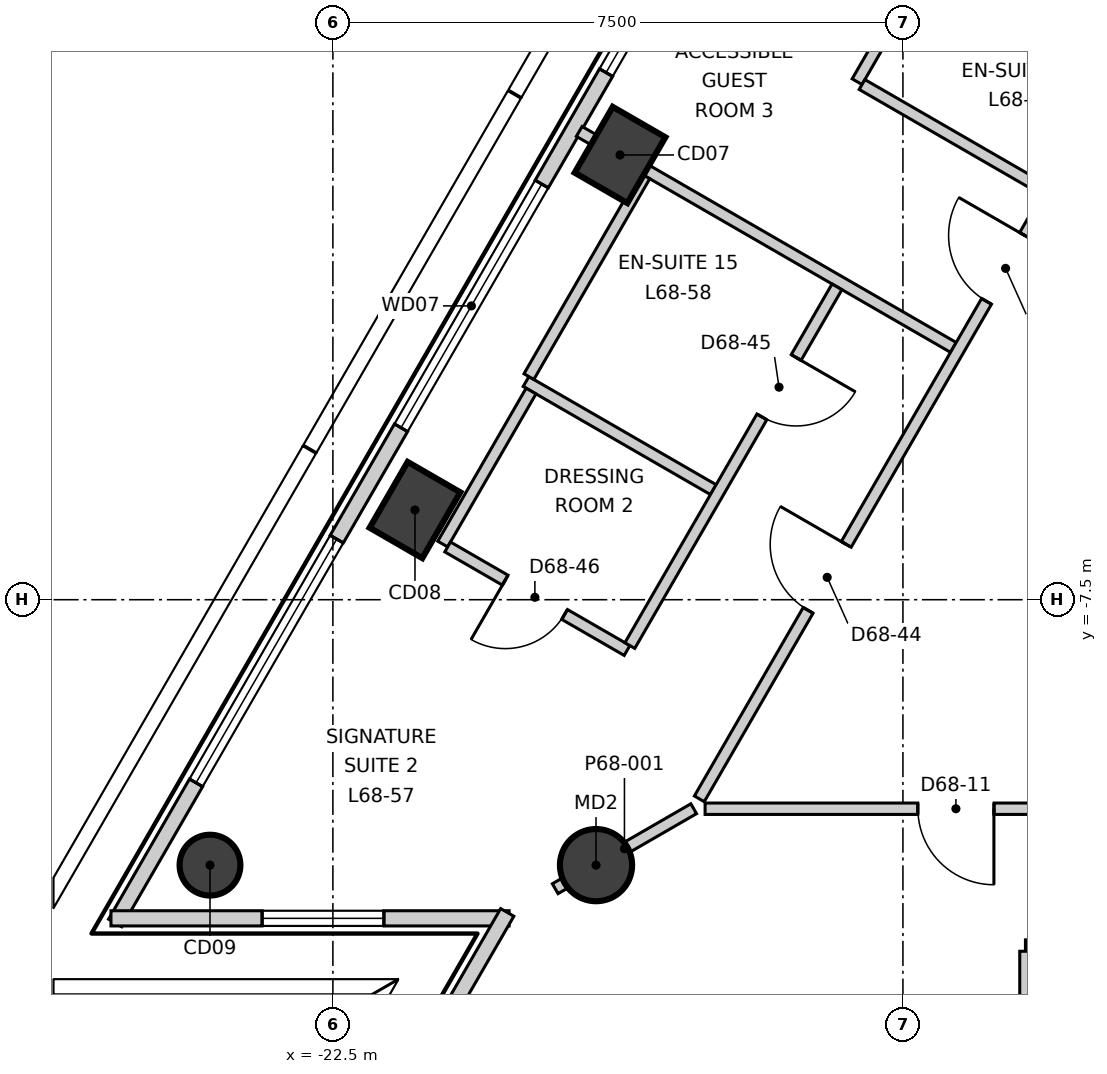
"""IFC4 building model, lengths in metres.
Left out: names, types, materials, properties, quantities, classifications, styles, units other than length and angle.
Written with IfcOpenShell. Run it as: python <this file> out.ifc"""

import sys

from ifc_helpers import new_model, si_unit, direction, frame, frame_2d, origin, origin_2d, place, context, subcontext, project, spatial, rectangle, circle, extrude, element, fill, save


model = new_model("IFC4")
c1 = context("Model", 3, precision=1e-05, world=origin(), true_north=direction((0.0, 1.0)))
c2 = subcontext(c1, "Body", "Model", "MODEL_VIEW")
j1 = project(units=[si_unit("LENGTHUNIT", "METRE"), si_unit("PLANEANGLEUNIT", "RADIAN")], contexts=[c1])
p1 = place(None, origin())
s1 = spatial("IfcSite", under=j1, at=p1, CompositionType="ELEMENT")
p2 = place(p1, origin())
s2 = spatial("IfcBuilding", under=s1, at=p2, CompositionType="ELEMENT")
p3 = place(p2, frame((0.0, 0.0, 289.9)))
s3 = spatial("IfcBuildingStorey", under=s2, at=p3, CompositionType="ELEMENT", Elevation=289.9)
for number, where, z_axis, x_axis in (
    (1, (-18.722, -1.649, -0.3), (0.0, 0.0, 1.0), (0.5, 0.866, 0.0)),
    (2, (-21.42, -6.32, -0.3), (0.0, 0.0, 1.0), (0.5, 0.866, 0.0)),
):
    element("IfcColumn", number, at=place(p3, frame(where, z_axis=z_axis, x_axis=x_axis)), inside=s3, PredefinedType="COLUMN", context=c2, shape_type="SweptSolid", body=[
        extrude(rectangle(XDim=1.0, YDim=0.8, at=origin_2d()), origin(), (0.0, 0.0, 1.0), 3.6),
    ])
p4 = place(p3, frame((-24.117, -10.992, -0.3), z_axis=(0.0, 0.0, 1.0), x_axis=(0.5, 0.866025403784, 0.0)))
e3 = element("IfcColumn", 3, at=p4, inside=s3, PredefinedType="COLUMN", context=c2, shape_type="SweptSolid", body=[
    extrude(circle(Radius=0.4, at=origin_2d()), origin(), (0.0, 0.0, 1.0), 3.6),
])
p5 = place(p3, frame((-19.038, -10.992, -0.3), z_axis=(0.0, 0.0, 1.0), x_axis=(1.0, 0.0, 0.0)))
e4 = element("IfcColumn", 4, at=p5, inside=s3, PredefinedType="COLUMN", context=c2, shape_type="SweptSolid", body=[
    extrude(circle(Radius=0.475, at=origin_2d()), origin(), (0.0, 0.0, 1.0), 3.6),
])
p6 = place(p3, frame((-2.494, 27.86, 0.0), z_axis=(0.0, 0.0, 1.0), x_axis=(-0.500008134474, -0.866020707292, 0.0)))
e5 = element("IfcWall", 5, at=p6, inside=s3, PredefinedType="ELEMENTEDWALL", context=c2, shape_type="SweptSolid", body=[
    extrude(rectangle(XDim=45.741, YDim=0.2, at=frame_2d((22.871, 0.0))), origin(), (0.0, 0.0, 1.0), 3.3),
])
p7 = place(p6, frame((2.15, 0.0, 0.9)))
e6 = element("IfcOpeningElement", 6, at=p7, cuts=e5, PredefinedType="OPENING", context=c2, shape_type="SweptSolid", body=[
    extrude(rectangle(XDim=3.7, YDim=2.2, at=frame_2d((1.85, 1.1))), frame((0.0, 0.11, 0.0), z_axis=(0.0, -1.0, 0.0), x_axis=(1.0, 0.0, 0.0)), (0.0, 0.0, 1.0), 0.22),
])
p8 = place(p6, frame((7.544, 0.0, 0.9)))
e7 = element("IfcOpeningElement", 7, at=p8, cuts=e5, PredefinedType="OPENING", context=c2, shape_type="SweptSolid", body=[
    extrude(rectangle(XDim=3.7, YDim=2.2, at=frame_2d((1.85, 1.1))), frame((0.0, 0.11, 0.0), z_axis=(0.0, -1.0, 0.0), x_axis=(1.0, 0.0, 0.0)), (0.0, 0.0, 1.0), 0.22),
])
p9 = place(p6, frame((12.939, 0.0, 0.9)))
e8 = element("IfcOpeningElement", 8, at=p9, cuts=e5, PredefinedType="OPENING", context=c2, shape_type="SweptSolid", body=[
    extrude(rectangle(XDim=3.7, YDim=2.2, at=frame_2d((1.85, 1.1))), frame((0.0, 0.11, 0.0), z_axis=(0.0, -1.0, 0.0), x_axis=(1.0, 0.0, 0.0)), (0.0, 0.0, 1.0), 0.22),
])
p10 = place(p6, frame((18.333, 0.0, 0.9)))
e9 = element("IfcOpeningElement", 9, at=p10, cuts=e5, PredefinedType="OPENING", context=c2, shape_type="SweptSolid", body=[
    extrude(rectangle(XDim=3.7, YDim=2.2, at=frame_2d((1.85, 1.1))), frame((0.0, 0.11, 0.0), z_axis=(0.0, -1.0, 0.0), x_axis=(1.0, 0.0, 0.0)), (0.0, 0.0, 1.0), 0.22),
])
p11 = place(p6, frame((23.728, 0.0, 0.9)))
e10 = element("IfcOpeningElement", 10, at=p11, cuts=e5, PredefinedType="OPENING", context=c2, shape_type="SweptSolid", body=[
    extrude(rectangle(XDim=3.7, YDim=2.2, at=frame_2d((1.85, 1.1))), frame((0.0, 0.11, 0.0), z_axis=(0.0, -1.0, 0.0), x_axis=(1.0, 0.0, 0.0)), (0.0, 0.0, 1.0), 0.22),
])
p12 = place(p6, frame((29.122, 0.0, 0.9)))
e11 = element("IfcOpeningElement", 11, at=p12, cuts=e5, PredefinedType="OPENING", context=c2, shape_type="SweptSolid", body=[
    extrude(rectangle(XDim=3.7, YDim=2.2, at=frame_2d((1.85, 1.1))), frame((0.0, 0.11, 0.0), z_axis=(0.0, -1.0, 0.0), x_axis=(1.0, 0.0, 0.0)), (0.0, 0.0, 1.0), 0.22),
])
p13 = place(p6, frame((34.517, 0.0, 0.9)))
e12 = element("IfcOpeningElement", 12, at=p13, cuts=e5, PredefinedType="OPENING", context=c2, shape_type="SweptSolid", body=[
    extrude(rectangle(XDim=3.7, YDim=2.2, at=frame_2d((1.85, 1.1))), frame((0.0, 0.11, 0.0), z_axis=(0.0, -1.0, 0.0), x_axis=(1.0, 0.0, 0.0)), (0.0, 0.0, 1.0), 0.22),
])
p14 = place(p6, frame((39.911, 0.0, 0.9)))
e13 = element("IfcOpeningElement", 13, at=p14, cuts=e5, PredefinedType="OPENING", context=c2, shape_type="SweptSolid", body=[
    extrude(rectangle(XDim=3.7, YDim=2.2, at=frame_2d((1.85, 1.1))), frame((0.0, 0.11, 0.0), z_axis=(0.0, -1.0, 0.0), x_axis=(1.0, 0.0, 0.0)), (0.0, 0.0, 1.0), 0.22),
])
p15 = place(p3, frame((-25.42, -11.692, 0.0), z_axis=(0.0, 0.0, 1.0), x_axis=(1.0, 0.0, 0.0)))
e14 = element("IfcWall", 14, at=p15, inside=s3, PredefinedType="ELEMENTEDWALL", context=c2, shape_type="SweptSolid", body=[
    extrude(rectangle(XDim=5.239, YDim=0.2, at=frame_2d((2.62, 0.0))), origin(), (0.0, 0.0, 1.0), 3.3),
])
p16 = place(p15, frame((1.99, 0.0, 0.9)))
e15 = element("IfcOpeningElement", 15, at=p16, cuts=e14, PredefinedType="OPENING", context=c2, shape_type="SweptSolid", body=[
    extrude(rectangle(XDim=1.6, YDim=2.2, at=frame_2d((0.8, 1.1))), frame((0.0, 0.11, 0.0), z_axis=(0.0, -1.0, 0.0), x_axis=(1.0, 0.0, 0.0)), (0.0, 0.0, 1.0), 0.22),
])
p17 = place(p3, frame((-20.206, -11.614, 0.0), z_axis=(0.0, 0.0, 1.0), x_axis=(-0.499933584342, -0.866063745487, 0.0)))
e16 = element("IfcWall", 16, at=p17, inside=s3, PredefinedType="ELEMENTEDWALL", context=c2, shape_type="SweptSolid", body=[
    extrude(rectangle(XDim=5.239, YDim=0.2, at=frame_2d((2.619, 0.0))), origin(), (0.0, 0.0, 1.0), 3.3),
])
p18 = place(p17, frame((1.39, 0.0, 0.9)))
e17 = element("IfcOpeningElement", 17, at=p18, cuts=e16, PredefinedType="OPENING", context=c2, shape_type="SweptSolid", body=[
    extrude(rectangle(XDim=1.6, YDim=2.2, at=frame_2d((0.8, 1.1))), frame((0.0, 0.11, 0.0), z_axis=(0.0, -1.0, 0.0), x_axis=(1.0, 0.0, 0.0)), (0.0, 0.0, 1.0), 0.22),
])
p19 = place(p3, frame((-19.575, -11.302, 0.0), z_axis=(0.0, 0.0, 1.0), x_axis=(0.866013598413, 0.500020446946, 0.0)))
e18 = element("IfcWall", 18, at=p19, inside=s3, PredefinedType="PARTITIONING", context=c2, shape_type="SweptSolid", body=[
    extrude(rectangle(XDim=2.104, YDim=0.15, at=frame_2d((1.052, 0.0))), origin(), (0.0, 0.0, 1.0), 2.8),
])
p20 = place(p3, frame((-19.259, -1.339, 0.0), z_axis=(0.0, 0.0, 1.0), x_axis=(0.86606758311, -0.499926936147, 0.0)))
e19 = element("IfcWall", 19, at=p20, inside=s3, PredefinedType="PARTITIONING", context=c2, shape_type="SweptSolid", body=[
    extrude(rectangle(XDim=5.684, YDim=0.15, at=frame_2d((2.842, 0.0))), origin(), (0.0, 0.0, 1.0), 3.3),
])
p21 = place(p3, frame((-17.603, -10.25, 0.0), z_axis=(0.0, 0.0, 1.0), x_axis=(1.0, 0.0, 0.0)))
e20 = element("IfcWall", 20, at=p21, inside=s3, PredefinedType="PARTITIONING", context=c2, shape_type="SweptSolid", body=[
    extrude(rectangle(XDim=35.356, YDim=0.15, at=frame_2d((17.678, 0.0))), origin(), (0.0, 0.0, 1.0), 3.3),
])
p22 = place(p21, frame((2.8, 0.0, 0.0)))
e21 = element("IfcOpeningElement", 21, at=p22, cuts=e20, PredefinedType="OPENING", context=c2, shape_type="SweptSolid", body=[
    extrude(rectangle(XDim=1.0, YDim=2.1, at=frame_2d((0.5, 1.05))), frame((0.0, 0.085, 0.0), z_axis=(0.0, -1.0, 0.0), x_axis=(1.0, 0.0, 0.0)), (0.0, 0.0, 1.0), 0.17),
])
p23 = place(p21, frame((15.065, 0.0, 0.0)))
e22 = element("IfcOpeningElement", 22, at=p23, cuts=e20, PredefinedType="OPENING", context=c2, shape_type="SweptSolid", body=[
    extrude(rectangle(XDim=1.0, YDim=2.1, at=frame_2d((0.5, 1.05))), frame((0.0, 0.085, 0.0), z_axis=(0.0, -1.0, 0.0), x_axis=(1.0, 0.0, 0.0)), (0.0, 0.0, 1.0), 0.17),
])
p24 = place(p21, frame((9.765, 0.0, 0.0)))
e23 = element("IfcOpeningElement", 23, at=p24, cuts=e20, PredefinedType="OPENING", context=c2, shape_type="SweptSolid", body=[
    extrude(rectangle(XDim=0.9, YDim=2.1, at=frame_2d((0.45, 1.05))), frame((0.0, 0.085, 0.0), z_axis=(0.0, -1.0, 0.0), x_axis=(1.0, 0.0, 0.0)), (0.0, 0.0, 1.0), 0.17),
])
p25 = place(p21, frame((11.965, 0.0, 0.0)))
e24 = element("IfcOpeningElement", 24, at=p25, cuts=e20, PredefinedType="OPENING", context=c2, shape_type="SweptSolid", body=[
    extrude(rectangle(XDim=0.9, YDim=2.1, at=frame_2d((0.45, 1.05))), frame((0.0, 0.085, 0.0), z_axis=(0.0, -1.0, 0.0), x_axis=(1.0, 0.0, 0.0)), (0.0, 0.0, 1.0), 0.17),
])
p26 = place(p21, frame((20.953, 0.0, 0.0)))
e25 = element("IfcOpeningElement", 25, at=p26, cuts=e20, PredefinedType="OPENING", context=c2, shape_type="SweptSolid", body=[
    extrude(rectangle(XDim=1.0, YDim=2.1, at=frame_2d((0.5, 1.05))), frame((0.0, 0.085, 0.0), z_axis=(0.0, -1.0, 0.0), x_axis=(1.0, 0.0, 0.0)), (0.0, 0.0, 1.0), 0.17),
])
p27 = place(p21, frame((26.347, 0.0, 0.0)))
e26 = element("IfcOpeningElement", 26, at=p27, cuts=e20, PredefinedType="OPENING", context=c2, shape_type="SweptSolid", body=[
    extrude(rectangle(XDim=1.0, YDim=2.1, at=frame_2d((0.5, 1.05))), frame((0.0, 0.085, 0.0), z_axis=(0.0, -1.0, 0.0), x_axis=(1.0, 0.0, 0.0)), (0.0, 0.0, 1.0), 0.17),
])
p28 = place(p21, frame((31.342, 0.0, 0.0)))
e27 = element("IfcOpeningElement", 27, at=p28, cuts=e20, PredefinedType="OPENING", context=c2, shape_type="SweptSolid", body=[
    extrude(rectangle(XDim=1.0, YDim=2.1, at=frame_2d((0.5, 1.05))), frame((0.0, 0.085, 0.0), z_axis=(0.0, -1.0, 0.0), x_axis=(1.0, 0.0, 0.0)), (0.0, 0.0, 1.0), 0.17),
])
p29 = place(p3, frame((-17.679, -10.12, 0.0), z_axis=(0.0, 0.0, 1.0), x_axis=(0.500008955215, 0.866020233427, 0.0)))
e28 = element("IfcWall", 28, at=p29, inside=s3, PredefinedType="PARTITIONING", context=c2, shape_type="SweptSolid", body=[
    extrude(rectangle(XDim=35.357, YDim=0.15, at=frame_2d((17.679, 0.0))), origin(), (0.0, 0.0, 1.0), 3.3),
])
p30 = place(p29, frame((31.407, 0.0, 0.0)))
e29 = element("IfcOpeningElement", 29, at=p30, cuts=e28, PredefinedType="OPENING", context=c2, shape_type="SweptSolid", body=[
    extrude(rectangle(XDim=1.0, YDim=2.1, at=frame_2d((0.5, 1.05))), frame((0.0, 0.085, 0.0), z_axis=(0.0, -1.0, 0.0), x_axis=(1.0, 0.0, 0.0)), (0.0, 0.0, 1.0), 0.17),
])
p31 = place(p29, frame((25.642, 0.0, 0.0)))
e30 = element("IfcOpeningElement", 30, at=p31, cuts=e28, PredefinedType="OPENING", context=c2, shape_type="SweptSolid", body=[
    extrude(rectangle(XDim=1.0, YDim=2.1, at=frame_2d((0.5, 1.05))), frame((0.0, 0.085, 0.0), z_axis=(0.0, -1.0, 0.0), x_axis=(1.0, 0.0, 0.0)), (0.0, 0.0, 1.0), 0.17),
])
p32 = place(p29, frame((18.348, 0.0, 0.0)))
e31 = element("IfcOpeningElement", 31, at=p32, cuts=e28, PredefinedType="OPENING", context=c2, shape_type="SweptSolid", body=[
    extrude(rectangle(XDim=1.0, YDim=2.1, at=frame_2d((0.5, 1.05))), frame((0.0, 0.085, 0.0), z_axis=(0.0, -1.0, 0.0), x_axis=(1.0, 0.0, 0.0)), (0.0, 0.0, 1.0), 0.17),
])
p33 = place(p29, frame((13.254, 0.0, 0.0)))
e32 = element("IfcOpeningElement", 32, at=p33, cuts=e28, PredefinedType="OPENING", context=c2, shape_type="SweptSolid", body=[
    extrude(rectangle(XDim=1.0, YDim=2.1, at=frame_2d((0.5, 1.05))), frame((0.0, 0.085, 0.0), z_axis=(0.0, -1.0, 0.0), x_axis=(1.0, 0.0, 0.0)), (0.0, 0.0, 1.0), 0.17),
])
p34 = place(p29, frame((7.559, 0.0, 0.0)))
e33 = element("IfcOpeningElement", 33, at=p34, cuts=e28, PredefinedType="OPENING", context=c2, shape_type="SweptSolid", body=[
    extrude(rectangle(XDim=1.0, YDim=2.1, at=frame_2d((0.5, 1.05))), frame((0.0, 0.085, 0.0), z_axis=(0.0, -1.0, 0.0), x_axis=(1.0, 0.0, 0.0)), (0.0, 0.0, 1.0), 0.17),
])
p35 = place(p29, frame((2.865, 0.0, 0.0)))
e34 = element("IfcOpeningElement", 34, at=p35, cuts=e28, PredefinedType="OPENING", context=c2, shape_type="SweptSolid", body=[
    extrude(rectangle(XDim=1.0, YDim=2.1, at=frame_2d((0.5, 1.05))), frame((0.0, 0.085, 0.0), z_axis=(0.0, -1.0, 0.0), x_axis=(1.0, 0.0, 0.0)), (0.0, 0.0, 1.0), 0.17),
])
p36 = place(p3, frame((-19.959, -4.63, 0.0), z_axis=(0.0, 0.0, 1.0), x_axis=(0.866085557634, -0.499895795999, 0.0)))
e35 = element("IfcWall", 35, at=p36, inside=s3, PredefinedType="PARTITIONING", context=c2, shape_type="SweptSolid", body=[
    extrude(rectangle(XDim=2.845, YDim=0.15, at=frame_2d((1.422, 0.0))), origin(), (0.0, 0.0, 1.0), 3.3),
])
p37 = place(p3, frame((-21.055, -6.768, 0.0), z_axis=(0.0, 0.0, 1.0), x_axis=(0.499855809005, 0.866108636491, 0.0)))
e36 = element("IfcWall", 36, at=p37, inside=s3, PredefinedType="PARTITIONING", context=c2, shape_type="SweptSolid", body=[
    extrude(rectangle(XDim=2.324, YDim=0.15, at=frame_2d((1.162, 0.0))), origin(), (0.0, 0.0, 1.0), 3.3),
])
p38 = place(p3, frame((-20.99, -6.806, 0.0), z_axis=(0.0, 0.0, 1.0), x_axis=(0.866112488944, -0.499849133735, 0.0)))
e37 = element("IfcWall", 37, at=p38, inside=s3, PredefinedType="PARTITIONING", context=c2, shape_type="SweptSolid", body=[
    extrude(rectangle(XDim=2.725, YDim=0.15, at=frame_2d((1.362, 0.0))), origin(), (0.0, 0.0, 1.0), 3.3),
])
p39 = place(p38, frame((0.875, 0.0, 0.0)))
e38 = element("IfcOpeningElement", 38, at=p39, cuts=e37, PredefinedType="OPENING", context=c2, shape_type="SweptSolid", body=[
    extrude(rectangle(XDim=0.9, YDim=2.1, at=frame_2d((0.45, 1.05))), frame((0.0, 0.085, 0.0), z_axis=(0.0, -1.0, 0.0), x_axis=(1.0, 0.0, 0.0)), (0.0, 0.0, 1.0), 0.17),
])
p40 = place(p3, frame((-18.593, -8.103, 0.0), z_axis=(0.0, 0.0, 1.0), x_axis=(0.500080528864, 0.865978905431, 0.0)))
e39 = element("IfcWall", 39, at=p40, inside=s3, PredefinedType="PARTITIONING", context=c2, shape_type="SweptSolid", body=[
    extrude(rectangle(XDim=5.449, YDim=0.15, at=frame_2d((2.725, 0.0))), origin(), (0.0, 0.0, 1.0), 3.3),
])
p41 = place(p40, frame((3.475, 0.0, 0.0)))
e40 = element("IfcOpeningElement", 40, at=p41, cuts=e39, PredefinedType="OPENING", context=c2, shape_type="SweptSolid", body=[
    extrude(rectangle(XDim=0.9, YDim=2.1, at=frame_2d((0.45, 1.05))), frame((0.0, 0.085, 0.0), z_axis=(0.0, -1.0, 0.0), x_axis=(1.0, 0.0, 0.0)), (0.0, 0.0, 1.0), 0.17),
])
p42 = place(p3, frame((-19.921, -4.565, 0.0), z_axis=(0.0, 0.0, 1.0), x_axis=(0.500048162978, 0.86599759509, 0.0)))
e41 = element("IfcWall", 41, at=p42, inside=s3, PredefinedType="PARTITIONING", context=c2, shape_type="SweptSolid", body=[
    extrude(rectangle(XDim=3.05, YDim=0.15, at=frame_2d((1.525, 0.0))), origin(), (0.0, 0.0, 1.0), 2.6),
])
p43 = place(p3, frame((-15.603, -0.685, 0.0), z_axis=(0.0, 0.0, 1.0), x_axis=(0.500187211558, 0.865917290158, 0.0)))
e42 = element("IfcWall", 42, at=p43, inside=s3, PredefinedType="PARTITIONING", context=c2, shape_type="SweptSolid", body=[
    extrude(rectangle(XDim=2.925, YDim=0.15, at=frame_2d((1.463, 0.0))), origin(), (0.0, 0.0, 1.0), 3.3),
])
p44 = place(p43, frame((1.05, 0.0, 0.0)))
e43 = element("IfcOpeningElement", 43, at=p44, cuts=e42, PredefinedType="OPENING", context=c2, shape_type="SweptSolid", body=[
    extrude(rectangle(XDim=0.9, YDim=2.1, at=frame_2d((0.45, 1.05))), frame((0.0, 0.085, 0.0), z_axis=(0.0, -1.0, 0.0), x_axis=(1.0, 0.0, 0.0)), (0.0, 0.0, 1.0), 0.17),
])
p45 = place(p3, frame((-15.538, -0.722, 0.0), z_axis=(0.0, 0.0, 1.0), x_axis=(0.866049104564, -0.499958946799, 0.0)))
e44 = element("IfcWall", 44, at=p45, inside=s3, PredefinedType="PARTITIONING", context=c2, shape_type="SweptSolid", body=[
    extrude(rectangle(XDim=2.77, YDim=0.15, at=frame_2d((1.385, 0.0))), origin(), (0.0, 0.0, 1.0), 3.3),
])
p46 = place(p3, frame((-13.388, -12.05, 0.0), z_axis=(0.0, 0.0, 1.0), x_axis=(1.0, 0.0, 0.0)))
e45 = element("IfcWall", 45, at=p46, inside=s3, PredefinedType="PARTITIONING", context=c2, shape_type="SweptSolid", body=[
    extrude(rectangle(XDim=2.525, YDim=0.15, at=frame_2d((1.262, 0.0))), origin(), (0.0, 0.0, 1.0), 3.3),
])
p47 = place(p3, frame((-13.388, -14.97, 0.0), z_axis=(0.0, 0.0, 1.0), x_axis=(0.0, 1.0, 0.0)))
e46 = element("IfcWall", 46, at=p47, inside=s3, PredefinedType="PARTITIONING", context=c2, shape_type="SweptSolid", body=[
    extrude(rectangle(XDim=2.845, YDim=0.15, at=frame_2d((1.422, 0.0))), origin(), (0.0, 0.0, 1.0), 3.3),
])
p48 = place(p47, frame((1.05, 0.0, 0.0)))
e47 = element("IfcOpeningElement", 47, at=p48, cuts=e46, PredefinedType="OPENING", context=c2, shape_type="SweptSolid", body=[
    extrude(rectangle(XDim=0.9, YDim=2.1, at=frame_2d((0.45, 1.05))), frame((0.0, 0.085, 0.0), z_axis=(0.0, -1.0, 0.0), x_axis=(1.0, 0.0, 0.0)), (0.0, 0.0, 1.0), 0.17),
])
p49 = place(p12, origin())
e48 = element("IfcWindow", 48, at=p49, inside=s3, PartitioningType="SINGLE_PANEL", PredefinedType="WINDOW", context=c2, shape_type="SweptSolid", body=[
    extrude(rectangle(XDim=3.7, YDim=2.2, at=frame_2d((1.85, 1.1))), frame((0.0, 0.03, 0.0), z_axis=(0.0, -1.0, 0.0), x_axis=(1.0, 0.0, 0.0)), (0.0, 0.0, 1.0), 0.06),
])
fill(e11, e48)
p50 = place(p13, origin())
e49 = element("IfcWindow", 49, at=p50, inside=s3, PartitioningType="SINGLE_PANEL", PredefinedType="WINDOW", context=c2, shape_type="SweptSolid", body=[
    extrude(rectangle(XDim=3.7, YDim=2.2, at=frame_2d((1.85, 1.1))), frame((0.0, 0.03, 0.0), z_axis=(0.0, -1.0, 0.0), x_axis=(1.0, 0.0, 0.0)), (0.0, 0.0, 1.0), 0.06),
])
fill(e12, e49)
p51 = place(p14, origin())
e50 = element("IfcWindow", 50, at=p51, inside=s3, PartitioningType="SINGLE_PANEL", PredefinedType="WINDOW", context=c2, shape_type="SweptSolid", body=[
    extrude(rectangle(XDim=3.7, YDim=2.2, at=frame_2d((1.85, 1.1))), frame((0.0, 0.03, 0.0), z_axis=(0.0, -1.0, 0.0), x_axis=(1.0, 0.0, 0.0)), (0.0, 0.0, 1.0), 0.06),
])
fill(e13, e50)
p52 = place(p16, origin())
e51 = element("IfcWindow", 51, at=p52, inside=s3, PartitioningType="SINGLE_PANEL", PredefinedType="WINDOW", context=c2, shape_type="SweptSolid", body=[
    extrude(rectangle(XDim=1.6, YDim=2.2, at=frame_2d((0.8, 1.1))), frame((0.0, 0.03, 0.0), z_axis=(0.0, -1.0, 0.0), x_axis=(1.0, 0.0, 0.0)), (0.0, 0.0, 1.0), 0.06),
])
fill(e15, e51)
p53 = place(p22, origin())
e52 = element("IfcDoor", 52, at=p53, inside=s3, OperationType="SINGLE_SWING_RIGHT", PredefinedType="DOOR", context=c2, shape_type="SweptSolid", body=[
    extrude(rectangle(XDim=1.0, YDim=2.1, at=frame_2d((0.5, 1.05))), frame((0.0, 0.025, 0.0), z_axis=(0.0, -1.0, 0.0), x_axis=(1.0, 0.0, 0.0)), (0.0, 0.0, 1.0), 0.05),
])
fill(e21, e52)
p54 = place(p34, origin())
e53 = element("IfcDoor", 53, at=p54, inside=s3, OperationType="SINGLE_SWING_LEFT", PredefinedType="DOOR", context=c2, shape_type="SweptSolid", body=[
    extrude(rectangle(XDim=1.0, YDim=2.1, at=frame_2d((0.5, 1.05))), frame((0.0, 0.025, 0.0), z_axis=(0.0, -1.0, 0.0), x_axis=(1.0, 0.0, 0.0)), (0.0, 0.0, 1.0), 0.05),
])
fill(e33, e53)
p55 = place(p35, origin())
e54 = element("IfcDoor", 54, at=p55, inside=s3, OperationType="SINGLE_SWING_LEFT", PredefinedType="DOOR", context=c2, shape_type="SweptSolid", body=[
    extrude(rectangle(XDim=1.0, YDim=2.1, at=frame_2d((0.5, 1.05))), frame((0.0, 0.025, 0.0), z_axis=(0.0, -1.0, 0.0), x_axis=(1.0, 0.0, 0.0)), (0.0, 0.0, 1.0), 0.05),
])
fill(e34, e54)
p56 = place(p41, origin())
e55 = element("IfcDoor", 55, at=p56, inside=s3, OperationType="SINGLE_SWING_RIGHT", PredefinedType="DOOR", context=c2, shape_type="SweptSolid", body=[
    extrude(rectangle(XDim=0.9, YDim=2.1, at=frame_2d((0.45, 1.05))), frame((0.0, 0.025, 0.0), z_axis=(0.0, -1.0, 0.0), x_axis=(1.0, 0.0, 0.0)), (0.0, 0.0, 1.0), 0.05),
])
fill(e40, e55)
p57 = place(p39, origin())
e56 = element("IfcDoor", 56, at=p57, inside=s3, OperationType="SINGLE_SWING_LEFT", PredefinedType="DOOR", context=c2, shape_type="SweptSolid", body=[
    extrude(rectangle(XDim=0.9, YDim=2.1, at=frame_2d((0.45, 1.05))), frame((0.0, 0.025, 0.0), z_axis=(0.0, -1.0, 0.0), x_axis=(1.0, 0.0, 0.0)), (0.0, 0.0, 1.0), 0.05),
])
fill(e38, e56)
save(model, sys.argv[1])
